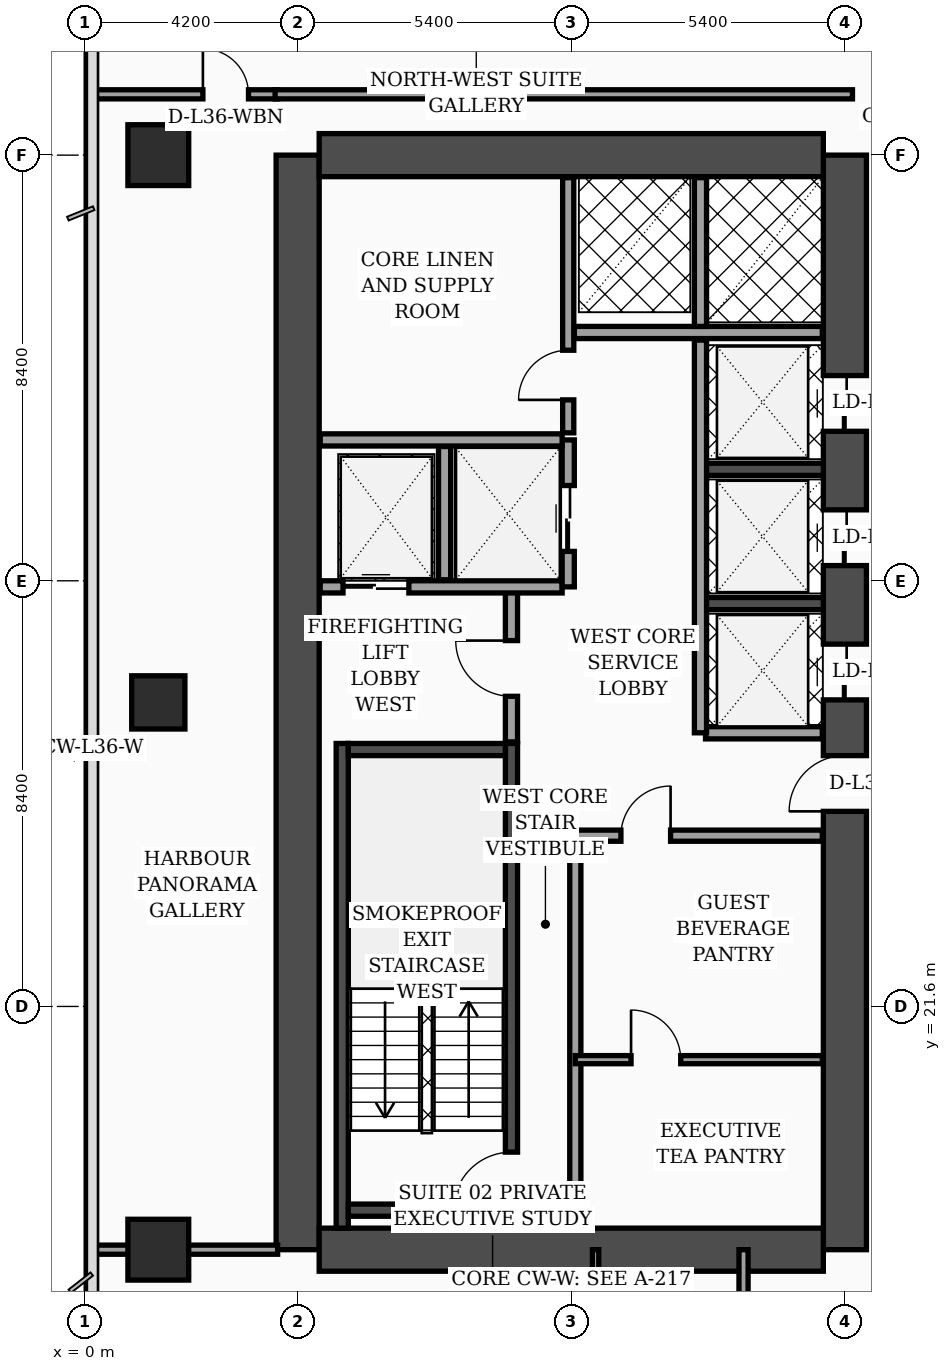
"""IFC4 building model, lengths in metres.
Left out: names, types, materials, properties, quantities, classifications, styles, units other than length and angle.
Written with IfcOpenShell. Run it as: python <this file> out.ifc"""

import sys

from ifc_helpers import new_model, si_unit, direction, frame, frame_2d, origin, origin_2d, place, context, subcontext, project, spatial, rectangle, extrude, element, fill, save


model = new_model("IFC4")
c1 = context("Model", 3, precision=1e-05, world=origin(), true_north=direction((0.0, 1.0)))
c2 = subcontext(c1, "Body", "Model", "MODEL_VIEW")
j1 = project(units=[si_unit("LENGTHUNIT", "METRE"), si_unit("PLANEANGLEUNIT", "RADIAN")], contexts=[c1])
p1 = place(None, origin())
s1 = spatial("IfcSite", under=j1, at=p1, CompositionType="ELEMENT")
p2 = place(p1, origin())
s2 = spatial("IfcBuilding", under=s1, at=p2, CompositionType="ELEMENT")
p3 = place(p2, frame((0.0, 0.0, 148.5)))
s3 = spatial("IfcBuildingStorey", under=s2, at=p3, CompositionType="ELEMENT", Elevation=148.5)
p4 = place(p3, frame((4.2, 16.8, 0.0), z_axis=(0.0, 0.0, 1.0), x_axis=(0.0, 1.0, 0.0)))
e1 = element("IfcWall", 1, at=p4, inside=s3, PredefinedType="SHEAR", context=c2, shape_type="SweptSolid", body=[
    extrude(rectangle(XDim=21.6, YDim=0.85, at=frame_2d((10.8, 0.0))), origin(), (0.0, 0.0, 1.0), 3.56),
])
p5 = place(p3, frame((15.0, 16.8, 0.0), z_axis=(0.0, 0.0, 1.0), x_axis=(0.0, 1.0, 0.0)))
e2 = element("IfcWall", 2, at=p5, inside=s3, PredefinedType="SHEAR", context=c2, shape_type="SweptSolid", body=[
    extrude(rectangle(XDim=21.6, YDim=0.85, at=frame_2d((10.8, 0.0))), origin(), (0.0, 0.0, 1.0), 3.56),
])
p6 = place(p5, frame((8.65, 0.0, 0.0)))
e3 = element("IfcOpeningElement", 3, at=p6, cuts=e2, PredefinedType="OPENING", context=c2, shape_type="SweptSolid", body=[
    extrude(rectangle(XDim=1.1, YDim=2.2, at=frame_2d((0.55, 1.1))), frame((0.0, 0.435, 0.0), z_axis=(0.0, -1.0, 0.0), x_axis=(1.0, 0.0, 0.0)), (0.0, 0.0, 1.0), 0.87),
])
p7 = place(p5, frame((10.85, 0.0, 0.0)))
e4 = element("IfcOpeningElement", 4, at=p7, cuts=e2, PredefinedType="OPENING", context=c2, shape_type="SweptSolid", body=[
    extrude(rectangle(XDim=1.1, YDim=2.2, at=frame_2d((0.55, 1.1))), frame((0.0, 0.435, 0.0), z_axis=(0.0, -1.0, 0.0), x_axis=(1.0, 0.0, 0.0)), (0.0, 0.0, 1.0), 0.87),
])
p8 = place(p5, frame((13.5, 0.0, 0.0)))
e5 = element("IfcOpeningElement", 5, at=p8, cuts=e2, PredefinedType="OPENING", context=c2, shape_type="SweptSolid", body=[
    extrude(rectangle(XDim=1.1, YDim=2.2, at=frame_2d((0.55, 1.1))), frame((0.0, 0.435, 0.0), z_axis=(0.0, -1.0, 0.0), x_axis=(1.0, 0.0, 0.0)), (0.0, 0.0, 1.0), 0.87),
])
p9 = place(p5, frame((16.15, 0.0, 0.0)))
e6 = element("IfcOpeningElement", 6, at=p9, cuts=e2, PredefinedType="OPENING", context=c2, shape_type="SweptSolid", body=[
    extrude(rectangle(XDim=1.1, YDim=2.2, at=frame_2d((0.55, 1.1))), frame((0.0, 0.435, 0.0), z_axis=(0.0, -1.0, 0.0), x_axis=(1.0, 0.0, 0.0)), (0.0, 0.0, 1.0), 0.87),
])
for number, where, z_axis, x_axis in (
    (7, (4.625, 38.4, 0.0), (0.0, 0.0, 1.0), (1.0, 0.0, 0.0)),
    (8, (4.625, 16.8, 0.0), (0.0, 0.0, 1.0), (1.0, 0.0, 0.0)),
):
    element("IfcWall", number, at=place(p3, frame(where, z_axis=z_axis, x_axis=x_axis)), inside=s3, PredefinedType="SHEAR", context=c2, shape_type="SweptSolid", body=[
        extrude(rectangle(XDim=9.95, YDim=0.85, at=frame_2d((4.975, 0.0))), origin(), (0.0, 0.0, 1.0), 3.56),
    ])
p10 = place(p3, frame((5.08, 17.225, 0.0), z_axis=(0.0, 0.0, 1.0), x_axis=(0.0, 1.0, 0.0)))
e9 = element("IfcWall", 9, at=p10, inside=s3, PredefinedType="SOLIDWALL", context=c2, shape_type="SweptSolid", body=[
    extrude(rectangle(XDim=9.565, YDim=0.24, at=frame_2d((4.782, 0.0))), origin(), (0.0, 0.0, 1.0), 3.56),
])
p11 = place(p3, frame((8.42, 17.225, 0.0), z_axis=(0.0, 0.0, 1.0), x_axis=(0.0, 1.0, 0.0)))
e10 = element("IfcWall", 10, at=p11, inside=s3, PredefinedType="SOLIDWALL", context=c2, shape_type="SweptSolid", body=[
    extrude(rectangle(XDim=9.565, YDim=0.24, at=frame_2d((4.782, 0.0))), origin(), (0.0, 0.0, 1.0), 3.56),
])
p12 = place(p11, frame((0.35, 0.0, 0.0)))
e11 = element("IfcOpeningElement", 11, at=p12, cuts=e10, PredefinedType="OPENING", context=c2, shape_type="SweptSolid", body=[
    extrude(rectangle(XDim=1.15, YDim=2.2, at=frame_2d((0.575, 1.1))), frame((0.0, 0.13, 0.0), z_axis=(0.0, -1.0, 0.0), x_axis=(1.0, 0.0, 0.0)), (0.0, 0.0, 1.0), 0.26),
])
for number, where, z_axis, x_axis in (
    (12, (5.2, 17.58, 0.0), (0.0, 0.0, 1.0), (1.0, 0.0, 0.0)),
    (13, (5.2, 26.67, 0.0), (0.0, 0.0, 1.0), (1.0, 0.0, 0.0)),
):
    element("IfcWall", number, at=place(p3, frame(where, z_axis=z_axis, x_axis=x_axis)), inside=s3, PredefinedType="SOLIDWALL", context=c2, shape_type="SweptSolid", body=[
        extrude(rectangle(XDim=3.1, YDim=0.24, at=frame_2d((1.55, 0.0))), origin(), (0.0, 0.0, 1.0), 3.56),
    ])
for number, where, z_axis, x_axis in (
    (14, (12.18, 29.55, 0.0), (0.0, 0.0, 1.0), (1.0, 0.0, 0.0)),
    (15, (12.18, 32.2, 0.0), (0.0, 0.0, 1.0), (1.0, 0.0, 0.0)),
):
    element("IfcWall", number, at=place(p3, frame(where, z_axis=z_axis, x_axis=x_axis)), inside=s3, PredefinedType="SOLIDWALL", context=c2, shape_type="SweptSolid", body=[
        extrude(rectangle(XDim=2.395, YDim=0.24, at=frame_2d((1.198, 0.0))), origin(), (0.0, 0.0, 1.0), 3.56),
    ])
p13 = place(p3, frame((1.45, 16.8, 0.0), z_axis=(0.0, 0.0, 1.0), x_axis=(1.0, 0.0, 0.0)))
e16 = element("IfcColumn", 16, at=p13, inside=s3, PredefinedType="COLUMN", context=c2, shape_type="SweptSolid", body=[
    extrude(rectangle(XDim=1.2, YDim=1.2, at=origin_2d()), origin(), (0.0, 0.0, 1.0), 3.56),
])
p14 = place(p3, frame((1.45, 27.6, 0.0), z_axis=(0.0, 0.0, 1.0), x_axis=(1.0, 0.0, 0.0)))
e17 = element("IfcColumn", 17, at=p14, inside=s3, PredefinedType="COLUMN", context=c2, shape_type="SweptSolid", body=[
    extrude(rectangle(XDim=1.05, YDim=1.05, at=origin_2d()), origin(), (0.0, 0.0, 1.0), 3.56),
])
p15 = place(p3, frame((1.45, 38.4, 0.0), z_axis=(0.0, 0.0, 1.0), x_axis=(1.0, 0.0, 0.0)))
e18 = element("IfcColumn", 18, at=p15, inside=s3, PredefinedType="COLUMN", context=c2, shape_type="SweptSolid", body=[
    extrude(rectangle(XDim=1.2, YDim=1.2, at=origin_2d()), origin(), (0.0, 0.0, 1.0), 3.56),
])
p16 = place(p3, frame((8.42, 26.82, 0.0), z_axis=(0.0, 0.0, 1.0), x_axis=(0.0, 1.0, 0.0)))
e19 = element("IfcWall", 19, at=p16, inside=s3, PredefinedType="SOLIDWALL", context=c2, shape_type="SweptSolid", body=[
    extrude(rectangle(XDim=3.0, YDim=0.24, at=frame_2d((1.5, 0.0))), origin(), (0.0, 0.0, 1.0), 3.56),
])
p17 = place(p16, frame((0.9, 0.0, 0.0)))
e20 = element("IfcOpeningElement", 20, at=p17, cuts=e19, PredefinedType="OPENING", context=c2, shape_type="SweptSolid", body=[
    extrude(rectangle(XDim=1.1, YDim=2.2, at=frame_2d((0.55, 1.1))), frame((0.0, 0.13, 0.0), z_axis=(0.0, -1.0, 0.0), x_axis=(1.0, 0.0, 0.0)), (0.0, 0.0, 1.0), 0.26),
])
p18 = place(p3, frame((4.645, 29.88, 0.0), z_axis=(0.0, 0.0, 1.0), x_axis=(1.0, 0.0, 0.0)))
e21 = element("IfcWall", 21, at=p18, inside=s3, PredefinedType="SOLIDWALL", context=c2, shape_type="SweptSolid", body=[
    extrude(rectangle(XDim=4.775, YDim=0.24, at=frame_2d((2.387, 0.0))), origin(), (0.0, 0.0, 1.0), 3.56),
])
p19 = place(p18, frame((0.45, 0.0, 0.0)))
e22 = element("IfcOpeningElement", 22, at=p19, cuts=e21, PredefinedType="OPENING", context=c2, shape_type="SweptSolid", body=[
    extrude(rectangle(XDim=1.3, YDim=2.35, at=frame_2d((0.65, 1.175))), frame((0.0, 0.13, 0.0), z_axis=(0.0, -1.0, 0.0), x_axis=(1.0, 0.0, 0.0)), (0.0, 0.0, 1.0), 0.26),
])
p20 = place(p3, frame((7.1, 30.02, 0.0), z_axis=(0.0, 0.0, 1.0), x_axis=(0.0, 1.0, 0.0)))
e23 = element("IfcWall", 23, at=p20, inside=s3, PredefinedType="SOLIDWALL", context=c2, shape_type="SweptSolid", body=[
    extrude(rectangle(XDim=2.63, YDim=0.24, at=frame_2d((1.315, 0.0))), origin(), (0.0, 0.0, 1.0), 3.56),
])
p21 = place(p3, frame((9.54, 29.88, 0.0), z_axis=(0.0, 0.0, 1.0), x_axis=(0.0, 1.0, 0.0)))
e24 = element("IfcWall", 24, at=p21, inside=s3, PredefinedType="SOLIDWALL", context=c2, shape_type="SweptSolid", body=[
    extrude(rectangle(XDim=2.9, YDim=0.24, at=frame_2d((1.45, 0.0))), origin(), (0.0, 0.0, 1.0), 3.56),
])
p22 = place(p21, frame((0.7, 0.0, 0.0)))
e25 = element("IfcOpeningElement", 25, at=p22, cuts=e24, PredefinedType="OPENING", context=c2, shape_type="SweptSolid", body=[
    extrude(rectangle(XDim=1.3, YDim=2.35, at=frame_2d((0.65, 1.175))), frame((0.0, 0.13, 0.0), z_axis=(0.0, -1.0, 0.0), x_axis=(1.0, 0.0, 0.0)), (0.0, 0.0, 1.0), 0.26),
])
p23 = place(p3, frame((4.645, 32.78, 0.0), z_axis=(0.0, 0.0, 1.0), x_axis=(1.0, 0.0, 0.0)))
e26 = element("IfcWall", 26, at=p23, inside=s3, PredefinedType="SOLIDWALL", context=c2, shape_type="SweptSolid", body=[
    extrude(rectangle(XDim=4.775, YDim=0.24, at=frame_2d((2.387, 0.0))), origin(), (0.0, 0.0, 1.0), 3.19),
])
p24 = place(p3, frame((9.68, 17.245, 0.0), z_axis=(0.0, 0.0, 1.0), x_axis=(0.0, 1.0, 0.0)))
e27 = element("IfcWall", 27, at=p24, inside=s3, PredefinedType="SOLIDWALL", context=c2, shape_type="SweptSolid", body=[
    extrude(rectangle(XDim=7.755, YDim=0.22, at=frame_2d((3.877, 0.0))), origin(), (0.0, 0.0, 1.0), 3.56),
])
p25 = place(p3, frame((9.54, 32.92, 0.0), z_axis=(0.0, 0.0, 1.0), x_axis=(0.0, 1.0, 0.0)))
e28 = element("IfcWall", 28, at=p25, inside=s3, PredefinedType="SOLIDWALL", context=c2, shape_type="SweptSolid", body=[
    extrude(rectangle(XDim=5.035, YDim=0.22, at=frame_2d((2.518, 0.0))), origin(), (0.0, 0.0, 1.0), 3.56),
])
p26 = place(p25, frame((0.65, 0.0, 0.0)))
e29 = element("IfcOpeningElement", 29, at=p26, cuts=e28, PredefinedType="OPENING", context=c2, shape_type="SweptSolid", body=[
    extrude(rectangle(XDim=0.98, YDim=2.15, at=frame_2d((0.49, 1.075))), frame((0.0, 0.12, 0.0), z_axis=(0.0, -1.0, 0.0), x_axis=(1.0, 0.0, 0.0)), (0.0, 0.0, 1.0), 0.24),
])
p27 = place(p3, frame((9.68, 20.55, 0.0), z_axis=(0.0, 0.0, 1.0), x_axis=(1.0, 0.0, 0.0)))
e30 = element("IfcWall", 30, at=p27, inside=s3, PredefinedType="PARTITIONING", context=c2, shape_type="SweptSolid", body=[
    extrude(rectangle(XDim=4.875, YDim=0.16, at=frame_2d((2.438, 0.0))), origin(), (0.0, 0.0, 1.0), 3.56),
])
p28 = place(p27, frame((1.1, 0.0, 0.0)))
e31 = element("IfcOpeningElement", 31, at=p28, cuts=e30, PredefinedType="OPENING", context=c2, shape_type="SweptSolid", body=[
    extrude(rectangle(XDim=0.98, YDim=2.15, at=frame_2d((0.49, 1.075))), frame((0.0, 0.09, 0.0), z_axis=(0.0, -1.0, 0.0), x_axis=(1.0, 0.0, 0.0)), (0.0, 0.0, 1.0), 0.18),
])
p29 = place(p3, frame((9.68, 24.97, 0.0), z_axis=(0.0, 0.0, 1.0), x_axis=(1.0, 0.0, 0.0)))
e32 = element("IfcWall", 32, at=p29, inside=s3, PredefinedType="SOLIDWALL", context=c2, shape_type="SweptSolid", body=[
    extrude(rectangle(XDim=4.875, YDim=0.22, at=frame_2d((2.438, 0.0))), origin(), (0.0, 0.0, 1.0), 2.94),
])
p30 = place(p29, frame((0.9, 0.0, 0.0)))
e33 = element("IfcOpeningElement", 33, at=p30, cuts=e32, PredefinedType="OPENING", context=c2, shape_type="SweptSolid", body=[
    extrude(rectangle(XDim=0.98, YDim=2.15, at=frame_2d((0.49, 1.075))), frame((0.0, 0.12, 0.0), z_axis=(0.0, -1.0, 0.0), x_axis=(1.0, 0.0, 0.0)), (0.0, 0.0, 1.0), 0.24),
])
p31 = place(p3, frame((12.25, 27.0, 0.0), z_axis=(0.0, 0.0, 1.0), x_axis=(1.0, 0.0, 0.0)))
e34 = element("IfcWall", 34, at=p31, inside=s3, PredefinedType="SOLIDWALL", context=c2, shape_type="SweptSolid", body=[
    extrude(rectangle(XDim=2.305, YDim=0.24, at=frame_2d((1.152, 0.0))), origin(), (0.0, 0.0, 1.0), 3.56),
])
p32 = place(p3, frame((12.15, 27.0, 0.0), z_axis=(0.0, 0.0, 1.0), x_axis=(0.0, 1.0, 0.0)))
e35 = element("IfcWall", 35, at=p32, inside=s3, PredefinedType="SOLIDWALL", context=c2, shape_type="SweptSolid", body=[
    extrude(rectangle(XDim=7.75, YDim=0.24, at=frame_2d((3.875, 0.0))), origin(), (0.0, 0.0, 1.0), 3.56),
])
p33 = place(p3, frame((9.66, 34.9, 0.0), z_axis=(0.0, 0.0, 1.0), x_axis=(1.0, 0.0, 0.0)))
e36 = element("IfcWall", 36, at=p33, inside=s3, PredefinedType="SOLIDWALL", context=c2, shape_type="SweptSolid", body=[
    extrude(rectangle(XDim=4.895, YDim=0.24, at=frame_2d((2.448, 0.0))), origin(), (0.0, 0.0, 1.0), 3.56),
])
p34 = place(p3, frame((12.15, 35.02, 0.0), z_axis=(0.0, 0.0, 1.0), x_axis=(0.0, 1.0, 0.0)))
e37 = element("IfcWall", 37, at=p34, inside=s3, PredefinedType="SOLIDWALL", context=c2, shape_type="SweptSolid", body=[
    extrude(rectangle(XDim=2.935, YDim=0.24, at=frame_2d((1.468, 0.0))), origin(), (0.0, 0.0, 1.0), 3.56),
])
p35 = place(p3, frame((0.08, 16.8, 0.0), z_axis=(0.0, 0.0, 1.0), x_axis=(1.0, 0.0, 0.0)))
e38 = element("IfcWall", 38, at=p35, inside=s3, PredefinedType="PARTITIONING", context=c2, shape_type="SweptSolid", body=[
    extrude(rectangle(XDim=3.725, YDim=0.18, at=frame_2d((1.862, 0.0))), origin(), (0.0, 0.0, 1.0), 2.94),
])
p36 = place(p3, frame((0.08, 39.6, 0.0), z_axis=(0.0, 0.0, 1.0), x_axis=(1.0, 0.0, 0.0)))
e39 = element("IfcWall", 39, at=p36, inside=s3, PredefinedType="PARTITIONING", context=c2, shape_type="SweptSolid", body=[
    extrude(rectangle(XDim=3.725, YDim=0.18, at=frame_2d((1.862, 0.0))), origin(), (0.0, 0.0, 1.0), 2.94),
])
p37 = place(p36, frame((2.25, 0.0, 0.0)))
e40 = element("IfcOpeningElement", 40, at=p37, cuts=e39, PredefinedType="OPENING", context=c2, shape_type="SweptSolid", body=[
    extrude(rectangle(XDim=0.9, YDim=2.15, at=frame_2d((0.45, 1.075))), frame((0.0, 0.1, 0.0), z_axis=(0.0, -1.0, 0.0), x_axis=(1.0, 0.0, 0.0)), (0.0, 0.0, 1.0), 0.2),
])
p38 = place(p3, frame((10.08, 14.75, 0.0), z_axis=(0.0, 0.0, 1.0), x_axis=(0.0, 1.0, 0.0)))
e41 = element("IfcWall", 41, at=p38, inside=s3, PredefinedType="PARTITIONING", context=c2, shape_type="SweptSolid", body=[
    extrude(rectangle(XDim=2.05, YDim=0.125, at=frame_2d((1.025, 0.0))), origin(), (0.0, 0.0, 1.0), 3.56),
])
p39 = place(p3, frame((13.0, 2.44, 0.0), z_axis=(0.0, 0.0, 1.0), x_axis=(0.0, 1.0, 0.0)))
e42 = element("IfcWall", 42, at=p39, inside=s3, PredefinedType="PARTITIONING", context=c2, shape_type="SweptSolid", body=[
    extrude(rectangle(XDim=14.36, YDim=0.18, at=frame_2d((7.18, 0.0))), origin(), (0.0, 0.0, 1.0), 2.94),
])
p40 = place(p39, frame((3.01, 0.0, 0.0)))
e43 = element("IfcOpeningElement", 43, at=p40, cuts=e42, PredefinedType="OPENING", context=c2, shape_type="SweptSolid", body=[
    extrude(rectangle(XDim=1.02, YDim=2.2, at=frame_2d((0.51, 1.1))), frame((0.0, 0.1, 0.0), z_axis=(0.0, -1.0, 0.0), x_axis=(1.0, 0.0, 0.0)), (0.0, 0.0, 1.0), 0.2),
])
p41 = place(p39, frame((9.95, 0.0, 0.0)))
e44 = element("IfcOpeningElement", 44, at=p41, cuts=e42, PredefinedType="OPENING", context=c2, shape_type="SweptSolid", body=[
    extrude(rectangle(XDim=1.02, YDim=2.2, at=frame_2d((0.51, 1.1))), frame((0.0, 0.1, 0.0), z_axis=(0.0, -1.0, 0.0), x_axis=(1.0, 0.0, 0.0)), (0.0, 0.0, 1.0), 0.2),
])
p42 = place(p3, frame((3.755, 39.6, 0.0), z_axis=(0.0, 0.0, 1.0), x_axis=(1.0, 0.0, 0.0)))
e45 = element("IfcWall", 45, at=p42, inside=s3, PredefinedType="PARTITIONING", context=c2, shape_type="SweptSolid", body=[
    extrude(rectangle(XDim=11.395, YDim=0.18, at=frame_2d((5.698, 0.0))), origin(), (0.0, 0.0, 1.0), 2.94),
])
p43 = place(p17, origin())
e46 = element("IfcDoor", 46, at=p43, inside=s3, OperationType="SINGLE_SWING_RIGHT", PredefinedType="DOOR", context=c2, shape_type="SweptSolid", body=[
    extrude(rectangle(XDim=1.1, YDim=2.2, at=frame_2d((0.55, 1.1))), frame((0.0, 0.025, 0.0), z_axis=(0.0, -1.0, 0.0), x_axis=(1.0, 0.0, 0.0)), (0.0, 0.0, 1.0), 0.05),
])
fill(e20, e46)
p44 = place(p19, origin())
e47 = element("IfcDoor", 47, at=p44, inside=s3, OperationType="DOUBLE_DOOR_SLIDING", PredefinedType="DOOR", context=c2, shape_type="SweptSolid", body=[
    extrude(rectangle(XDim=1.3, YDim=2.35, at=frame_2d((0.65, 1.175))), frame((0.0, 0.025, 0.0), z_axis=(0.0, -1.0, 0.0), x_axis=(1.0, 0.0, 0.0)), (0.0, 0.0, 1.0), 0.05),
])
fill(e22, e47)
p45 = place(p22, origin())
e48 = element("IfcDoor", 48, at=p45, inside=s3, OperationType="DOUBLE_DOOR_SLIDING", PredefinedType="DOOR", context=c2, shape_type="SweptSolid", body=[
    extrude(rectangle(XDim=1.3, YDim=2.35, at=frame_2d((0.65, 1.175))), frame((0.0, 0.025, 0.0), z_axis=(0.0, -1.0, 0.0), x_axis=(1.0, 0.0, 0.0)), (0.0, 0.0, 1.0), 0.05),
])
fill(e25, e48)
p46 = place(p26, origin())
e49 = element("IfcDoor", 49, at=p46, inside=s3, OperationType="SINGLE_SWING_LEFT", PredefinedType="DOOR", context=c2, shape_type="SweptSolid", body=[
    extrude(rectangle(XDim=0.98, YDim=2.15, at=frame_2d((0.49, 1.075))), frame((0.0, 0.025, 0.0), z_axis=(0.0, -1.0, 0.0), x_axis=(1.0, 0.0, 0.0)), (0.0, 0.0, 1.0), 0.05),
])
fill(e29, e49)
p47 = place(p28, origin())
e50 = element("IfcDoor", 50, at=p47, inside=s3, OperationType="SINGLE_SWING_LEFT", PredefinedType="DOOR", context=c2, shape_type="SweptSolid", body=[
    extrude(rectangle(XDim=0.98, YDim=2.15, at=frame_2d((0.49, 1.075))), frame((0.0, 0.025, 0.0), z_axis=(0.0, -1.0, 0.0), x_axis=(1.0, 0.0, 0.0)), (0.0, 0.0, 1.0), 0.05),
])
fill(e31, e50)
p48 = place(p30, origin())
e51 = element("IfcDoor", 51, at=p48, inside=s3, OperationType="SINGLE_SWING_RIGHT", PredefinedType="DOOR", context=c2, shape_type="SweptSolid", body=[
    extrude(rectangle(XDim=0.98, YDim=2.15, at=frame_2d((0.49, 1.075))), frame((0.0, 0.025, 0.0), z_axis=(0.0, -1.0, 0.0), x_axis=(1.0, 0.0, 0.0)), (0.0, 0.0, 1.0), 0.05),
])
fill(e33, e51)
p49 = place(p37, origin())
e52 = element("IfcDoor", 52, at=p49, inside=s3, OperationType="SINGLE_SWING_LEFT", PredefinedType="DOOR", context=c2, shape_type="SweptSolid", body=[
    extrude(rectangle(XDim=0.9, YDim=2.15, at=frame_2d((0.45, 1.075))), frame((0.0, 0.025, 0.0), z_axis=(0.0, -1.0, 0.0), x_axis=(1.0, 0.0, 0.0)), (0.0, 0.0, 1.0), 0.05),
])
fill(e40, e52)
p50 = place(p12, origin())
e53 = element("IfcDoor", 53, at=p50, inside=s3, OperationType="SINGLE_SWING_LEFT", PredefinedType="DOOR", context=c2, shape_type="SweptSolid", body=[
    extrude(rectangle(XDim=1.15, YDim=2.2, at=frame_2d((0.575, 1.1))), frame((0.0, 0.025, 0.0), z_axis=(0.0, -1.0, 0.0), x_axis=(1.0, 0.0, 0.0)), (0.0, 0.0, 1.0), 0.05),
])
fill(e11, e53)
p51 = place(p6, origin())
e54 = element("IfcDoor", 54, at=p51, inside=s3, OperationType="SINGLE_SWING_LEFT", PredefinedType="DOOR", context=c2, shape_type="SweptSolid", body=[
    extrude(rectangle(XDim=1.1, YDim=2.2, at=frame_2d((0.55, 1.1))), frame((0.0, 0.025, 0.0), z_axis=(0.0, -1.0, 0.0), x_axis=(1.0, 0.0, 0.0)), (0.0, 0.0, 1.0), 0.05),
])
fill(e3, e54)
p52 = place(p7, origin())
e55 = element("IfcDoor", 55, at=p52, inside=s3, OperationType="DOUBLE_DOOR_SLIDING", PredefinedType="DOOR", context=c2, shape_type="SweptSolid", body=[
    extrude(rectangle(XDim=1.1, YDim=2.2, at=frame_2d((0.55, 1.1))), frame((0.0, 0.025, 0.0), z_axis=(0.0, -1.0, 0.0), x_axis=(1.0, 0.0, 0.0)), (0.0, 0.0, 1.0), 0.05),
])
fill(e4, e55)
p53 = place(p8, origin())
e56 = element("IfcDoor", 56, at=p53, inside=s3, OperationType="DOUBLE_DOOR_SLIDING", PredefinedType="DOOR", context=c2, shape_type="SweptSolid", body=[
    extrude(rectangle(XDim=1.1, YDim=2.2, at=frame_2d((0.55, 1.1))), frame((0.0, 0.025, 0.0), z_axis=(0.0, -1.0, 0.0), x_axis=(1.0, 0.0, 0.0)), (0.0, 0.0, 1.0), 0.05),
])
fill(e5, e56)
p54 = place(p9, origin())
e57 = element("IfcDoor", 57, at=p54, inside=s3, OperationType="DOUBLE_DOOR_SLIDING", PredefinedType="DOOR", context=c2, shape_type="SweptSolid", body=[
    extrude(rectangle(XDim=1.1, YDim=2.2, at=frame_2d((0.55, 1.1))), frame((0.0, 0.025, 0.0), z_axis=(0.0, -1.0, 0.0), x_axis=(1.0, 0.0, 0.0)), (0.0, 0.0, 1.0), 0.05),
])
fill(e6, e57)
save(model, sys.argv[1])
